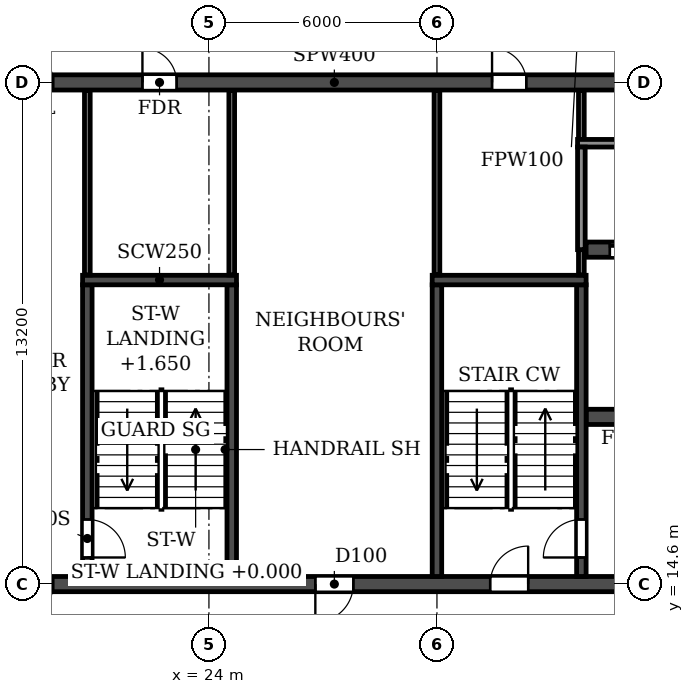
"""IFC4 building model, lengths in metres.
Left out: names, types, materials, properties, quantities, classifications, styles, units other than length and angle.
Written with IfcOpenShell. Run it as: python <this file> out.ifc"""

import sys

from ifc_helpers import new_model, si_unit, direction, frame, frame_2d, origin, place, context, subcontext, project, spatial, rectangle, extrude, element, fill, save


model = new_model("IFC4")
c1 = context("Model", 3, precision=1e-05, world=origin(), true_north=direction((0.0, 1.0)))
c2 = subcontext(c1, "Body", "Model", "MODEL_VIEW")
j1 = project(units=[si_unit("LENGTHUNIT", "METRE"), si_unit("PLANEANGLEUNIT", "RADIAN")], contexts=[c1])
p1 = place(None, origin())
s1 = spatial("IfcSite", under=j1, at=p1, CompositionType="ELEMENT")
p2 = place(p1, origin())
s2 = spatial("IfcBuilding", under=s1, at=p2, CompositionType="ELEMENT")
p3 = place(p2, frame((0.0, 0.0, 181.8)))
s3 = spatial("IfcBuildingStorey", under=s2, at=p3, CompositionType="ELEMENT", Elevation=181.8)
p4 = place(p3, frame((18.2, 14.6, 0.0), z_axis=(0.0, 0.0, 1.0), x_axis=(1.0, 0.0, 0.0)))
e1 = element("IfcWall", 1, at=p4, inside=s3, PredefinedType="SOLIDWALL", context=c2, shape_type="SweptSolid", body=[
    extrude(rectangle(XDim=65.6, YDim=0.4, at=frame_2d((32.8, 0.0))), origin(), (0.0, 0.0, 1.0), 3.08),
])
p5 = place(p4, frame((0.7, 0.0, 0.0)))
e2 = element("IfcOpeningElement", 2, at=p5, cuts=e1, PredefinedType="OPENING", context=c2, shape_type="SweptSolid", body=[
    extrude(rectangle(XDim=1.0, YDim=2.1, at=frame_2d((0.5, 1.05))), frame((0.0, 0.21, 0.0), z_axis=(0.0, -1.0, 0.0), x_axis=(1.0, 0.0, 0.0)), (0.0, 0.0, 1.0), 0.42),
])
p6 = place(p4, frame((8.6, 0.0, 0.0)))
e3 = element("IfcOpeningElement", 3, at=p6, cuts=e1, PredefinedType="OPENING", context=c2, shape_type="SweptSolid", body=[
    extrude(rectangle(XDim=1.0, YDim=2.1, at=frame_2d((0.5, 1.05))), frame((0.0, 0.21, 0.0), z_axis=(0.0, -1.0, 0.0), x_axis=(1.0, 0.0, 0.0)), (0.0, 0.0, 1.0), 0.42),
])
p7 = place(p4, frame((13.2, 0.0, 0.0)))
e4 = element("IfcOpeningElement", 4, at=p7, cuts=e1, PredefinedType="OPENING", context=c2, shape_type="SweptSolid", body=[
    extrude(rectangle(XDim=1.0, YDim=2.1, at=frame_2d((0.5, 1.05))), frame((0.0, 0.21, 0.0), z_axis=(0.0, -1.0, 0.0), x_axis=(1.0, 0.0, 0.0)), (0.0, 0.0, 1.0), 0.42),
])
p8 = place(p4, frame((24.5, 0.0, 0.0)))
e5 = element("IfcOpeningElement", 5, at=p8, cuts=e1, PredefinedType="OPENING", context=c2, shape_type="SweptSolid", body=[
    extrude(rectangle(XDim=1.0, YDim=2.1, at=frame_2d((0.5, 1.05))), frame((0.0, 0.21, 0.0), z_axis=(0.0, -1.0, 0.0), x_axis=(1.0, 0.0, 0.0)), (0.0, 0.0, 1.0), 0.42),
])
p9 = place(p4, frame((28.4, 0.0, 0.0)))
e6 = element("IfcOpeningElement", 6, at=p9, cuts=e1, PredefinedType="OPENING", context=c2, shape_type="SweptSolid", body=[
    extrude(rectangle(XDim=1.0, YDim=2.1, at=frame_2d((0.5, 1.05))), frame((0.0, 0.21, 0.0), z_axis=(0.0, -1.0, 0.0), x_axis=(1.0, 0.0, 0.0)), (0.0, 0.0, 1.0), 0.42),
])
p10 = place(p4, frame((32.3, 0.0, 0.0)))
e7 = element("IfcOpeningElement", 7, at=p10, cuts=e1, PredefinedType="OPENING", context=c2, shape_type="SweptSolid", body=[
    extrude(rectangle(XDim=1.0, YDim=2.1, at=frame_2d((0.5, 1.05))), frame((0.0, 0.21, 0.0), z_axis=(0.0, -1.0, 0.0), x_axis=(1.0, 0.0, 0.0)), (0.0, 0.0, 1.0), 0.42),
])
p11 = place(p4, frame((34.9, 0.0, 0.0)))
e8 = element("IfcOpeningElement", 8, at=p11, cuts=e1, PredefinedType="OPENING", context=c2, shape_type="SweptSolid", body=[
    extrude(rectangle(XDim=1.0, YDim=2.1, at=frame_2d((0.5, 1.05))), frame((0.0, 0.21, 0.0), z_axis=(0.0, -1.0, 0.0), x_axis=(1.0, 0.0, 0.0)), (0.0, 0.0, 1.0), 0.42),
])
p12 = place(p4, frame((38.8, 0.0, 0.0)))
e9 = element("IfcOpeningElement", 9, at=p12, cuts=e1, PredefinedType="OPENING", context=c2, shape_type="SweptSolid", body=[
    extrude(rectangle(XDim=1.0, YDim=2.1, at=frame_2d((0.5, 1.05))), frame((0.0, 0.21, 0.0), z_axis=(0.0, -1.0, 0.0), x_axis=(1.0, 0.0, 0.0)), (0.0, 0.0, 1.0), 0.42),
])
p13 = place(p4, frame((51.4, 0.0, 0.0)))
e10 = element("IfcOpeningElement", 10, at=p13, cuts=e1, PredefinedType="OPENING", context=c2, shape_type="SweptSolid", body=[
    extrude(rectangle(XDim=1.0, YDim=2.1, at=frame_2d((0.5, 1.05))), frame((0.0, 0.21, 0.0), z_axis=(0.0, -1.0, 0.0), x_axis=(1.0, 0.0, 0.0)), (0.0, 0.0, 1.0), 0.42),
])
p14 = place(p4, frame((56.0, 0.0, 0.0)))
e11 = element("IfcOpeningElement", 11, at=p14, cuts=e1, PredefinedType="OPENING", context=c2, shape_type="SweptSolid", body=[
    extrude(rectangle(XDim=1.0, YDim=2.1, at=frame_2d((0.5, 1.05))), frame((0.0, 0.21, 0.0), z_axis=(0.0, -1.0, 0.0), x_axis=(1.0, 0.0, 0.0)), (0.0, 0.0, 1.0), 0.42),
])
p15 = place(p4, frame((63.9, 0.0, 0.0)))
e12 = element("IfcOpeningElement", 12, at=p15, cuts=e1, PredefinedType="OPENING", context=c2, shape_type="SweptSolid", body=[
    extrude(rectangle(XDim=1.0, YDim=2.1, at=frame_2d((0.5, 1.05))), frame((0.0, 0.21, 0.0), z_axis=(0.0, -1.0, 0.0), x_axis=(1.0, 0.0, 0.0)), (0.0, 0.0, 1.0), 0.42),
])
p16 = place(p3, frame((18.2, 27.8, 0.0), z_axis=(0.0, 0.0, 1.0), x_axis=(1.0, 0.0, 0.0)))
e13 = element("IfcWall", 13, at=p16, inside=s3, PredefinedType="SOLIDWALL", context=c2, shape_type="SweptSolid", body=[
    extrude(rectangle(XDim=65.6, YDim=0.4, at=frame_2d((32.8, 0.0))), origin(), (0.0, 0.0, 1.0), 3.08),
])
p17 = place(p16, frame((0.7, 0.0, 0.0)))
e14 = element("IfcOpeningElement", 14, at=p17, cuts=e13, PredefinedType="OPENING", context=c2, shape_type="SweptSolid", body=[
    extrude(rectangle(XDim=1.0, YDim=2.1, at=frame_2d((0.5, 1.05))), frame((0.0, 0.21, 0.0), z_axis=(0.0, -1.0, 0.0), x_axis=(1.0, 0.0, 0.0)), (0.0, 0.0, 1.0), 0.42),
])
p18 = place(p16, frame((4.05, 0.0, 0.0)))
e15 = element("IfcOpeningElement", 15, at=p18, cuts=e13, PredefinedType="OPENING", context=c2, shape_type="SweptSolid", body=[
    extrude(rectangle(XDim=0.9, YDim=2.1, at=frame_2d((0.45, 1.05))), frame((0.0, 0.21, 0.0), z_axis=(0.0, -1.0, 0.0), x_axis=(1.0, 0.0, 0.0)), (0.0, 0.0, 1.0), 0.42),
])
p19 = place(p16, frame((13.25, 0.0, 0.0)))
e16 = element("IfcOpeningElement", 16, at=p19, cuts=e13, PredefinedType="OPENING", context=c2, shape_type="SweptSolid", body=[
    extrude(rectangle(XDim=0.9, YDim=2.1, at=frame_2d((0.45, 1.05))), frame((0.0, 0.21, 0.0), z_axis=(0.0, -1.0, 0.0), x_axis=(1.0, 0.0, 0.0)), (0.0, 0.0, 1.0), 0.42),
])
p20 = place(p16, frame((19.0, 0.0, 0.0)))
e17 = element("IfcOpeningElement", 17, at=p20, cuts=e13, PredefinedType="OPENING", context=c2, shape_type="SweptSolid", body=[
    extrude(rectangle(XDim=1.0, YDim=2.1, at=frame_2d((0.5, 1.05))), frame((0.0, 0.21, 0.0), z_axis=(0.0, -1.0, 0.0), x_axis=(1.0, 0.0, 0.0)), (0.0, 0.0, 1.0), 0.42),
])
p21 = place(p16, frame((24.2, 0.0, 0.0)))
e18 = element("IfcOpeningElement", 18, at=p21, cuts=e13, PredefinedType="OPENING", context=c2, shape_type="SweptSolid", body=[
    extrude(rectangle(XDim=1.0, YDim=2.1, at=frame_2d((0.5, 1.05))), frame((0.0, 0.21, 0.0), z_axis=(0.0, -1.0, 0.0), x_axis=(1.0, 0.0, 0.0)), (0.0, 0.0, 1.0), 0.42),
])
p22 = place(p16, frame((29.4, 0.0, 0.0)))
e19 = element("IfcOpeningElement", 19, at=p22, cuts=e13, PredefinedType="OPENING", context=c2, shape_type="SweptSolid", body=[
    extrude(rectangle(XDim=1.0, YDim=2.1, at=frame_2d((0.5, 1.05))), frame((0.0, 0.21, 0.0), z_axis=(0.0, -1.0, 0.0), x_axis=(1.0, 0.0, 0.0)), (0.0, 0.0, 1.0), 0.42),
])
p23 = place(p16, frame((32.3, 0.0, 0.0)))
e20 = element("IfcOpeningElement", 20, at=p23, cuts=e13, PredefinedType="OPENING", context=c2, shape_type="SweptSolid", body=[
    extrude(rectangle(XDim=1.0, YDim=2.1, at=frame_2d((0.5, 1.05))), frame((0.0, 0.21, 0.0), z_axis=(0.0, -1.0, 0.0), x_axis=(1.0, 0.0, 0.0)), (0.0, 0.0, 1.0), 0.42),
])
p24 = place(p16, frame((36.5, 0.0, 0.0)))
e21 = element("IfcOpeningElement", 21, at=p24, cuts=e13, PredefinedType="OPENING", context=c2, shape_type="SweptSolid", body=[
    extrude(rectangle(XDim=1.0, YDim=2.1, at=frame_2d((0.5, 1.05))), frame((0.0, 0.21, 0.0), z_axis=(0.0, -1.0, 0.0), x_axis=(1.0, 0.0, 0.0)), (0.0, 0.0, 1.0), 0.42),
])
p25 = place(p16, frame((40.4, 0.0, 0.0)))
e22 = element("IfcOpeningElement", 22, at=p25, cuts=e13, PredefinedType="OPENING", context=c2, shape_type="SweptSolid", body=[
    extrude(rectangle(XDim=1.0, YDim=2.1, at=frame_2d((0.5, 1.05))), frame((0.0, 0.21, 0.0), z_axis=(0.0, -1.0, 0.0), x_axis=(1.0, 0.0, 0.0)), (0.0, 0.0, 1.0), 0.42),
])
p26 = place(p16, frame((43.0, 0.0, 0.0)))
e23 = element("IfcOpeningElement", 23, at=p26, cuts=e13, PredefinedType="OPENING", context=c2, shape_type="SweptSolid", body=[
    extrude(rectangle(XDim=1.0, YDim=2.1, at=frame_2d((0.5, 1.05))), frame((0.0, 0.21, 0.0), z_axis=(0.0, -1.0, 0.0), x_axis=(1.0, 0.0, 0.0)), (0.0, 0.0, 1.0), 0.42),
])
p27 = place(p16, frame((46.65, 0.0, 0.0)))
e24 = element("IfcOpeningElement", 24, at=p27, cuts=e13, PredefinedType="OPENING", context=c2, shape_type="SweptSolid", body=[
    extrude(rectangle(XDim=1.5, YDim=2.1, at=frame_2d((0.75, 1.05))), frame((0.0, 0.21, 0.0), z_axis=(0.0, -1.0, 0.0), x_axis=(1.0, 0.0, 0.0)), (0.0, 0.0, 1.0), 0.42),
])
p28 = place(p16, frame((51.45, 0.0, 0.0)))
e25 = element("IfcOpeningElement", 25, at=p28, cuts=e13, PredefinedType="OPENING", context=c2, shape_type="SweptSolid", body=[
    extrude(rectangle(XDim=0.9, YDim=2.1, at=frame_2d((0.45, 1.05))), frame((0.0, 0.21, 0.0), z_axis=(0.0, -1.0, 0.0), x_axis=(1.0, 0.0, 0.0)), (0.0, 0.0, 1.0), 0.42),
])
p29 = place(p16, frame((60.65, 0.0, 0.0)))
e26 = element("IfcOpeningElement", 26, at=p29, cuts=e13, PredefinedType="OPENING", context=c2, shape_type="SweptSolid", body=[
    extrude(rectangle(XDim=0.9, YDim=2.1, at=frame_2d((0.45, 1.05))), frame((0.0, 0.21, 0.0), z_axis=(0.0, -1.0, 0.0), x_axis=(1.0, 0.0, 0.0)), (0.0, 0.0, 1.0), 0.42),
])
p30 = place(p16, frame((63.9, 0.0, 0.0)))
e27 = element("IfcOpeningElement", 27, at=p30, cuts=e13, PredefinedType="OPENING", context=c2, shape_type="SweptSolid", body=[
    extrude(rectangle(XDim=1.0, YDim=2.1, at=frame_2d((0.5, 1.05))), frame((0.0, 0.21, 0.0), z_axis=(0.0, -1.0, 0.0), x_axis=(1.0, 0.0, 0.0)), (0.0, 0.0, 1.0), 0.42),
])
p31 = place(p3, frame((33.925, 19.0, 0.0), z_axis=(0.0, 0.0, 1.0), x_axis=(1.0, 0.0, 0.0)))
e28 = element("IfcWall", 28, at=p31, inside=s3, PredefinedType="SOLIDWALL", context=c2, shape_type="SweptSolid", body=[
    extrude(rectangle(XDim=34.15, YDim=0.4, at=frame_2d((17.075, 0.0))), origin(), (0.0, 0.0, 1.0), 3.08),
])
p32 = place(p31, frame((16.175, 0.0, 0.0)))
e29 = element("IfcOpeningElement", 29, at=p32, cuts=e28, PredefinedType="OPENING", context=c2, shape_type="SweptSolid", body=[
    extrude(rectangle(XDim=1.8, YDim=2.1, at=frame_2d((0.9, 1.05))), frame((0.0, 0.21, 0.0), z_axis=(0.0, -1.0, 0.0), x_axis=(1.0, 0.0, 0.0)), (0.0, 0.0, 1.0), 0.42),
])
p33 = place(p31, frame((1.525, 0.0, 0.0)))
e30 = element("IfcOpeningElement", 30, at=p33, cuts=e28, PredefinedType="OPENING", context=c2, shape_type="SweptSolid", body=[
    extrude(rectangle(XDim=1.8, YDim=2.1, at=frame_2d((0.9, 1.05))), frame((0.0, 0.21, 0.0), z_axis=(0.0, -1.0, 0.0), x_axis=(1.0, 0.0, 0.0)), (0.0, 0.0, 1.0), 0.42),
])
p34 = place(p31, frame((30.825, 0.0, 0.0)))
e31 = element("IfcOpeningElement", 31, at=p34, cuts=e28, PredefinedType="OPENING", context=c2, shape_type="SweptSolid", body=[
    extrude(rectangle(XDim=1.8, YDim=2.1, at=frame_2d((0.9, 1.05))), frame((0.0, 0.21, 0.0), z_axis=(0.0, -1.0, 0.0), x_axis=(1.0, 0.0, 0.0)), (0.0, 0.0, 1.0), 0.42),
])
p35 = place(p3, frame((33.925, 23.4, 0.0), z_axis=(0.0, 0.0, 1.0), x_axis=(1.0, 0.0, 0.0)))
e32 = element("IfcWall", 32, at=p35, inside=s3, PredefinedType="SOLIDWALL", context=c2, shape_type="SweptSolid", body=[
    extrude(rectangle(XDim=34.15, YDim=0.4, at=frame_2d((17.075, 0.0))), origin(), (0.0, 0.0, 1.0), 3.08),
])
p36 = place(p35, frame((16.175, 0.0, 0.0)))
e33 = element("IfcOpeningElement", 33, at=p36, cuts=e32, PredefinedType="OPENING", context=c2, shape_type="SweptSolid", body=[
    extrude(rectangle(XDim=1.8, YDim=2.1, at=frame_2d((0.9, 1.05))), frame((0.0, 0.21, 0.0), z_axis=(0.0, -1.0, 0.0), x_axis=(1.0, 0.0, 0.0)), (0.0, 0.0, 1.0), 0.42),
])
p37 = place(p35, frame((0.625, 0.0, 0.0)))
e34 = element("IfcOpeningElement", 34, at=p37, cuts=e32, PredefinedType="OPENING", context=c2, shape_type="SweptSolid", body=[
    extrude(rectangle(XDim=1.1, YDim=2.1, at=frame_2d((0.55, 1.05))), frame((0.0, 0.21, 0.0), z_axis=(0.0, -1.0, 0.0), x_axis=(1.0, 0.0, 0.0)), (0.0, 0.0, 1.0), 0.42),
])
p38 = place(p35, frame((3.225, 0.0, 0.0)))
e35 = element("IfcOpeningElement", 35, at=p38, cuts=e32, PredefinedType="OPENING", context=c2, shape_type="SweptSolid", body=[
    extrude(rectangle(XDim=1.1, YDim=2.1, at=frame_2d((0.55, 1.05))), frame((0.0, 0.21, 0.0), z_axis=(0.0, -1.0, 0.0), x_axis=(1.0, 0.0, 0.0)), (0.0, 0.0, 1.0), 0.42),
])
p39 = place(p35, frame((5.825, 0.0, 0.0)))
e36 = element("IfcOpeningElement", 36, at=p39, cuts=e32, PredefinedType="OPENING", context=c2, shape_type="SweptSolid", body=[
    extrude(rectangle(XDim=1.1, YDim=2.1, at=frame_2d((0.55, 1.05))), frame((0.0, 0.21, 0.0), z_axis=(0.0, -1.0, 0.0), x_axis=(1.0, 0.0, 0.0)), (0.0, 0.0, 1.0), 0.42),
])
p40 = place(p35, frame((8.425, 0.0, 0.0)))
e37 = element("IfcOpeningElement", 37, at=p40, cuts=e32, PredefinedType="OPENING", context=c2, shape_type="SweptSolid", body=[
    extrude(rectangle(XDim=1.1, YDim=2.1, at=frame_2d((0.55, 1.05))), frame((0.0, 0.21, 0.0), z_axis=(0.0, -1.0, 0.0), x_axis=(1.0, 0.0, 0.0)), (0.0, 0.0, 1.0), 0.42),
])
p41 = place(p35, frame((11.025, 0.0, 0.0)))
e38 = element("IfcOpeningElement", 38, at=p41, cuts=e32, PredefinedType="OPENING", context=c2, shape_type="SweptSolid", body=[
    extrude(rectangle(XDim=1.1, YDim=2.1, at=frame_2d((0.55, 1.05))), frame((0.0, 0.21, 0.0), z_axis=(0.0, -1.0, 0.0), x_axis=(1.0, 0.0, 0.0)), (0.0, 0.0, 1.0), 0.42),
])
p42 = place(p35, frame((13.625, 0.0, 0.0)))
e39 = element("IfcOpeningElement", 39, at=p42, cuts=e32, PredefinedType="OPENING", context=c2, shape_type="SweptSolid", body=[
    extrude(rectangle(XDim=1.1, YDim=2.1, at=frame_2d((0.55, 1.05))), frame((0.0, 0.21, 0.0), z_axis=(0.0, -1.0, 0.0), x_axis=(1.0, 0.0, 0.0)), (0.0, 0.0, 1.0), 0.42),
])
p43 = place(p35, frame((27.225, 0.0, 0.0)))
e40 = element("IfcOpeningElement", 40, at=p43, cuts=e32, PredefinedType="OPENING", context=c2, shape_type="SweptSolid", body=[
    extrude(rectangle(XDim=1.1, YDim=2.1, at=frame_2d((0.55, 1.05))), frame((0.0, 0.21, 0.0), z_axis=(0.0, -1.0, 0.0), x_axis=(1.0, 0.0, 0.0)), (0.0, 0.0, 1.0), 0.42),
])
p44 = place(p3, frame((30.0, 14.8, 0.0), z_axis=(0.0, 0.0, 1.0), x_axis=(0.0, 1.0, 0.0)))
e41 = element("IfcWall", 41, at=p44, inside=s3, PredefinedType="SOLIDWALL", context=c2, shape_type="SweptSolid", body=[
    extrude(rectangle(XDim=7.675, YDim=0.25, at=frame_2d((3.837, 0.0))), origin(), (0.0, 0.0, 1.0), 3.08),
])
p45 = place(p3, frame((33.8, 14.8, 0.0), z_axis=(0.0, 0.0, 1.0), x_axis=(0.0, 1.0, 0.0)))
e42 = element("IfcWall", 42, at=p45, inside=s3, PredefinedType="SOLIDWALL", context=c2, shape_type="SweptSolid", body=[
    extrude(rectangle(XDim=7.675, YDim=0.25, at=frame_2d((3.837, 0.0))), origin(), (0.0, 0.0, 1.0), 3.08),
])
p46 = place(p45, frame((0.5, 0.0, 0.0)))
e43 = element("IfcOpeningElement", 43, at=p46, cuts=e42, PredefinedType="OPENING", context=c2, shape_type="SweptSolid", body=[
    extrude(rectangle(XDim=1.0, YDim=2.1, at=frame_2d((0.5, 1.05))), frame((0.0, 0.135, 0.0), z_axis=(0.0, -1.0, 0.0), x_axis=(1.0, 0.0, 0.0)), (0.0, 0.0, 1.0), 0.27),
])
p47 = place(p3, frame((29.875, 22.6, 0.0), z_axis=(0.0, 0.0, 1.0), x_axis=(1.0, 0.0, 0.0)))
e44 = element("IfcWall", 44, at=p47, inside=s3, PredefinedType="SOLIDWALL", context=c2, shape_type="SweptSolid", body=[
    extrude(rectangle(XDim=4.05, YDim=0.25, at=frame_2d((2.025, 0.0))), origin(), (0.0, 0.0, 1.0), 3.08),
])
p48 = place(p3, frame((20.8, 14.8, 0.0), z_axis=(0.0, 0.0, 1.0), x_axis=(0.0, 1.0, 0.0)))
e45 = element("IfcWall", 45, at=p48, inside=s3, PredefinedType="SOLIDWALL", context=c2, shape_type="SweptSolid", body=[
    extrude(rectangle(XDim=7.675, YDim=0.25, at=frame_2d((3.837, 0.0))), origin(), (0.0, 0.0, 1.0), 3.08),
])
p49 = place(p48, frame((0.5, 0.0, 0.0)))
e46 = element("IfcOpeningElement", 46, at=p49, cuts=e45, PredefinedType="OPENING", context=c2, shape_type="SweptSolid", body=[
    extrude(rectangle(XDim=1.0, YDim=2.1, at=frame_2d((0.5, 1.05))), frame((0.0, 0.135, 0.0), z_axis=(0.0, -1.0, 0.0), x_axis=(1.0, 0.0, 0.0)), (0.0, 0.0, 1.0), 0.27),
])
p50 = place(p3, frame((24.6, 14.8, 0.0), z_axis=(0.0, 0.0, 1.0), x_axis=(0.0, 1.0, 0.0)))
e47 = element("IfcWall", 47, at=p50, inside=s3, PredefinedType="SOLIDWALL", context=c2, shape_type="SweptSolid", body=[
    extrude(rectangle(XDim=7.675, YDim=0.25, at=frame_2d((3.837, 0.0))), origin(), (0.0, 0.0, 1.0), 3.08),
])
p51 = place(p3, frame((20.675, 22.6, 0.0), z_axis=(0.0, 0.0, 1.0), x_axis=(1.0, 0.0, 0.0)))
e48 = element("IfcWall", 48, at=p51, inside=s3, PredefinedType="SOLIDWALL", context=c2, shape_type="SweptSolid", body=[
    extrude(rectangle(XDim=4.05, YDim=0.25, at=frame_2d((2.025, 0.0))), origin(), (0.0, 0.0, 1.0), 3.08),
])
for number, where, z_axis, x_axis in (
    (49, (20.8, 22.735, 0.0), (0.0, 0.0, 1.0), (0.0, 1.0, 0.0)),
    (50, (24.6, 22.735, 0.0), (0.0, 0.0, 1.0), (0.0, 1.0, 0.0)),
    (51, (30.0, 22.735, 0.0), (0.0, 0.0, 1.0), (0.0, 1.0, 0.0)),
):
    element("IfcWall", number, at=place(p3, frame(where, z_axis=z_axis, x_axis=x_axis)), inside=s3, PredefinedType="PARTITIONING", context=c2, shape_type="SweptSolid", body=[
        extrude(rectangle(XDim=4.855, YDim=0.15, at=frame_2d((2.427, 0.0))), origin(), (0.0, 0.0, 1.0), 3.08),
    ])
p52 = place(p3, frame((33.8, 22.735, 0.0), z_axis=(0.0, 0.0, 1.0), x_axis=(0.0, 1.0, 0.0)))
e52 = element("IfcWall", 52, at=p52, inside=s3, PredefinedType="PARTITIONING", context=c2, shape_type="SweptSolid", body=[
    extrude(rectangle(XDim=0.665, YDim=0.15, at=frame_2d((0.333, 0.0))), origin(), (0.0, 0.0, 1.0), 3.08),
])
p53 = place(p3, frame((33.8, 26.3, 0.0), z_axis=(0.0, 0.0, 1.0), x_axis=(0.0, 1.0, 0.0)))
e53 = element("IfcWall", 53, at=p53, inside=s3, PredefinedType="PARTITIONING", context=c2, shape_type="SweptSolid", body=[
    extrude(rectangle(XDim=1.29, YDim=0.15, at=frame_2d((0.645, 0.0))), origin(), (0.0, 0.0, 1.0), 3.08),
])
p54 = place(p3, frame((33.7, 26.2, 0.0), z_axis=(0.0, 0.0, 1.0), x_axis=(1.0, 0.0, 0.0)))
e54 = element("IfcWall", 54, at=p54, inside=s3, PredefinedType="PARTITIONING", context=c2, shape_type="SweptSolid", body=[
    extrude(rectangle(XDim=10.4, YDim=0.2, at=frame_2d((5.2, 0.0))), origin(), (0.0, 0.0, 1.0), 3.08),
])
p55 = place(p3, frame((33.8, 23.4, 0.0), z_axis=(0.0, 0.0, 1.0), x_axis=(0.0, 1.0, 0.0)))
e55 = element("IfcWall", 55, at=p55, inside=s3, PredefinedType="PARTITIONING", context=c2, shape_type="SweptSolid", body=[
    extrude(rectangle(XDim=2.7, YDim=0.2, at=frame_2d((1.35, 0.0))), origin(), (0.0, 0.0, 1.0), 3.08),
])
p56 = place(p17, origin())
e56 = element("IfcDoor", 56, at=p56, inside=s3, OperationType="SINGLE_SWING_LEFT", PredefinedType="DOOR", context=c2, shape_type="SweptSolid", body=[
    extrude(rectangle(XDim=1.0, YDim=2.1, at=frame_2d((0.5, 1.05))), frame((0.0, 0.025, 0.0), z_axis=(0.0, -1.0, 0.0), x_axis=(1.0, 0.0, 0.0)), (0.0, 0.0, 1.0), 0.05),
])
fill(e14, e56)
p57 = place(p18, origin())
e57 = element("IfcDoor", 57, at=p57, inside=s3, OperationType="SINGLE_SWING_LEFT", PredefinedType="DOOR", context=c2, shape_type="SweptSolid", body=[
    extrude(rectangle(XDim=0.9, YDim=2.1, at=frame_2d((0.45, 1.05))), frame((0.0, 0.025, 0.0), z_axis=(0.0, -1.0, 0.0), x_axis=(1.0, 0.0, 0.0)), (0.0, 0.0, 1.0), 0.05),
])
fill(e15, e57)
p58 = place(p19, origin())
e58 = element("IfcDoor", 58, at=p58, inside=s3, OperationType="SINGLE_SWING_LEFT", PredefinedType="DOOR", context=c2, shape_type="SweptSolid", body=[
    extrude(rectangle(XDim=0.9, YDim=2.1, at=frame_2d((0.45, 1.05))), frame((0.0, 0.025, 0.0), z_axis=(0.0, -1.0, 0.0), x_axis=(1.0, 0.0, 0.0)), (0.0, 0.0, 1.0), 0.05),
])
fill(e16, e58)
p59 = place(p5, frame((1.0, 0.0, 0.0), z_axis=(0.0, 0.0, 1.0), x_axis=(-1.0, 0.0, 0.0)))
e59 = element("IfcDoor", 59, at=p59, inside=s3, OperationType="SINGLE_SWING_RIGHT", PredefinedType="DOOR", context=c2, shape_type="SweptSolid", body=[
    extrude(rectangle(XDim=1.0, YDim=2.1, at=frame_2d((0.5, 1.05))), frame((0.0, 0.025, 0.0), z_axis=(0.0, -1.0, 0.0), x_axis=(1.0, 0.0, 0.0)), (0.0, 0.0, 1.0), 0.05),
])
fill(e2, e59)
p60 = place(p6, frame((1.0, 0.0, 0.0), z_axis=(0.0, 0.0, 1.0), x_axis=(-1.0, 0.0, 0.0)))
e60 = element("IfcDoor", 60, at=p60, inside=s3, OperationType="SINGLE_SWING_RIGHT", PredefinedType="DOOR", context=c2, shape_type="SweptSolid", body=[
    extrude(rectangle(XDim=1.0, YDim=2.1, at=frame_2d((0.5, 1.05))), frame((0.0, 0.025, 0.0), z_axis=(0.0, -1.0, 0.0), x_axis=(1.0, 0.0, 0.0)), (0.0, 0.0, 1.0), 0.05),
])
fill(e3, e60)
p61 = place(p7, origin())
e61 = element("IfcDoor", 61, at=p61, inside=s3, OperationType="SINGLE_SWING_RIGHT", PredefinedType="DOOR", context=c2, shape_type="SweptSolid", body=[
    extrude(rectangle(XDim=1.0, YDim=2.1, at=frame_2d((0.5, 1.05))), frame((0.0, 0.025, 0.0), z_axis=(0.0, -1.0, 0.0), x_axis=(1.0, 0.0, 0.0)), (0.0, 0.0, 1.0), 0.05),
])
fill(e4, e61)
p62 = place(p46, origin())
e62 = element("IfcDoor", 62, at=p62, inside=s3, OperationType="SINGLE_SWING_LEFT", PredefinedType="DOOR", context=c2, shape_type="SweptSolid", body=[
    extrude(rectangle(XDim=1.0, YDim=2.1, at=frame_2d((0.5, 1.05))), frame((0.0, 0.025, 0.0), z_axis=(0.0, -1.0, 0.0), x_axis=(1.0, 0.0, 0.0)), (0.0, 0.0, 1.0), 0.05),
])
fill(e43, e62)
p63 = place(p37, origin())
e63 = element("IfcDoor", 63, at=p63, inside=s3, OperationType="DOUBLE_DOOR_SLIDING", PredefinedType="DOOR", context=c2, shape_type="SweptSolid", body=[
    extrude(rectangle(XDim=1.1, YDim=2.1, at=frame_2d((0.55, 1.05))), frame((0.0, 0.025, 0.0), z_axis=(0.0, -1.0, 0.0), x_axis=(1.0, 0.0, 0.0)), (0.0, 0.0, 1.0), 0.05),
])
fill(e34, e63)
p64 = place(p49, frame((1.0, 0.0, 0.0), z_axis=(0.0, 0.0, 1.0), x_axis=(-1.0, 0.0, 0.0)))
e64 = element("IfcDoor", 64, at=p64, inside=s3, OperationType="SINGLE_SWING_RIGHT", PredefinedType="DOOR", context=c2, shape_type="SweptSolid", body=[
    extrude(rectangle(XDim=1.0, YDim=2.1, at=frame_2d((0.5, 1.05))), frame((0.0, 0.025, 0.0), z_axis=(0.0, -1.0, 0.0), x_axis=(1.0, 0.0, 0.0)), (0.0, 0.0, 1.0), 0.05),
])
fill(e46, e64)
save(model, sys.argv[1])
